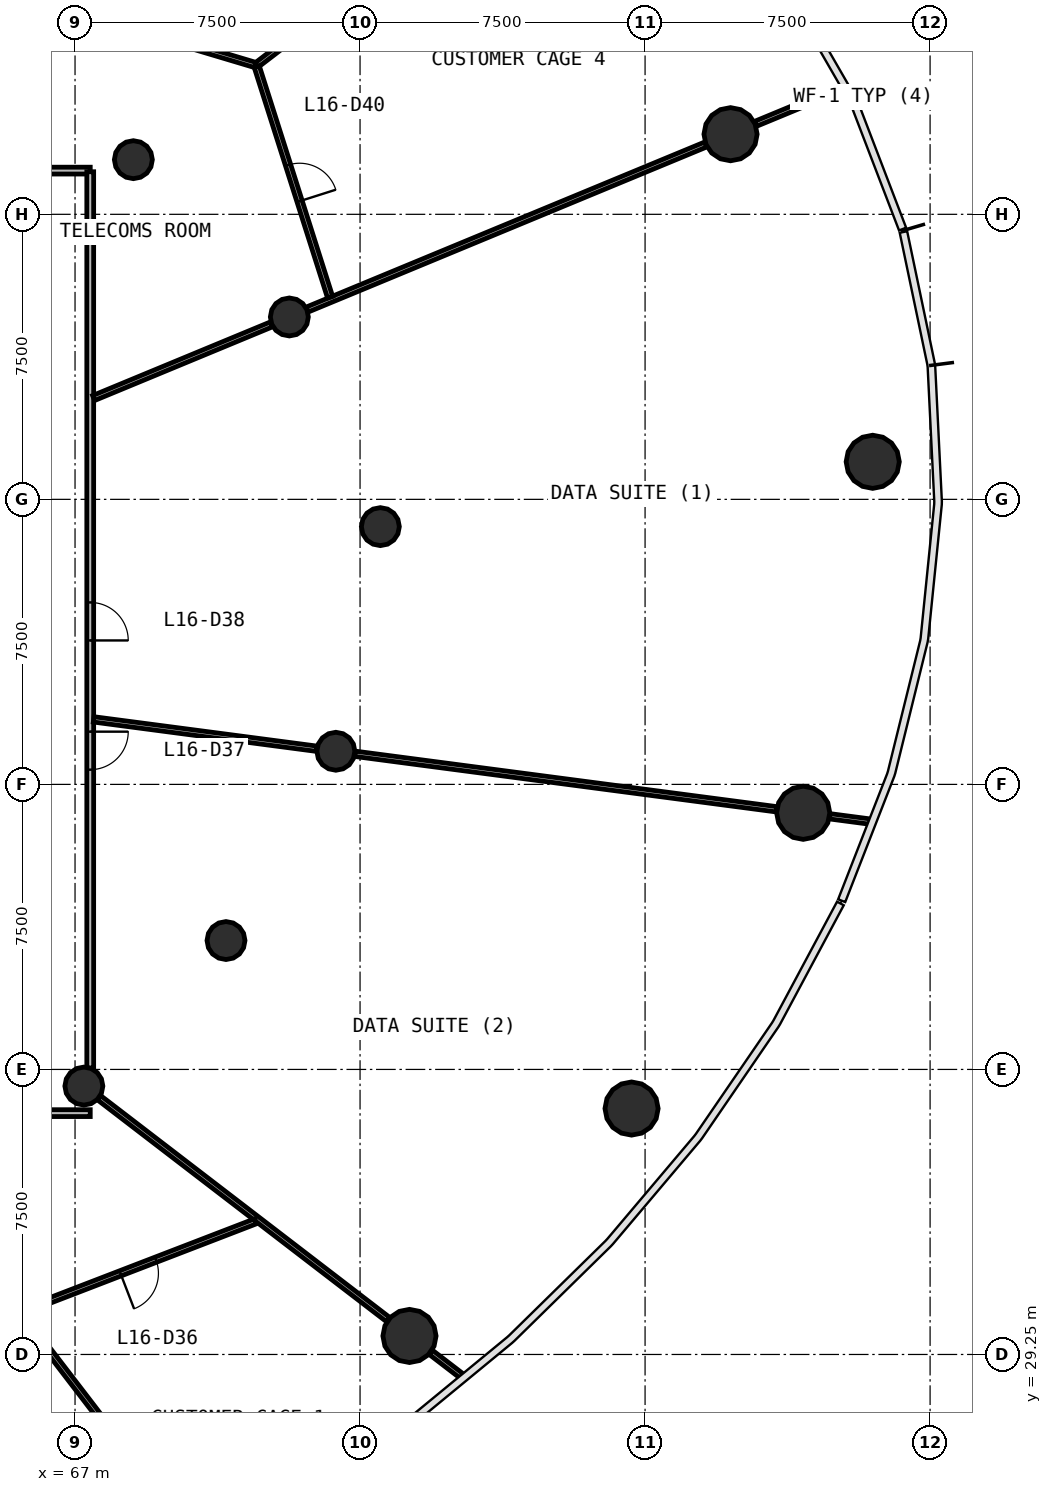
"""IFC4 building model, lengths in metres.
Left out: names, types, materials, properties, quantities, classifications, styles, units other than length and angle.
Written with IfcOpenShell. Run it as: python <this file> out.ifc"""

import sys

from ifc_helpers import new_model, si_unit, direction, frame, frame_2d, origin, origin_2d, place, context, subcontext, project, spatial, rectangle, circle, extrude, source, transform, mapped, element, fill, save


model = new_model("IFC4")
c1 = context("Model", 3, precision=1e-05, world=origin(), true_north=direction((0.0, 1.0)))
c2 = subcontext(c1, "Body", "Model", "MODEL_VIEW")
j1 = project(units=[si_unit("LENGTHUNIT", "METRE"), si_unit("PLANEANGLEUNIT", "RADIAN")], contexts=[c1])
p1 = place(None, origin())
s1 = spatial("IfcSite", under=j1, at=p1, CompositionType="ELEMENT")
p2 = place(p1, origin())
s2 = spatial("IfcBuilding", under=s1, at=p2, CompositionType="ELEMENT")
p3 = place(p2, frame((0.0, 0.0, 71.0)))
s3 = spatial("IfcBuildingStorey", under=s2, at=p3, CompositionType="ELEMENT", Elevation=71.0)
m1 = source(origin(), c2, "Body", "SweptSolid", [
    extrude(circle(Radius=0.7, at=origin_2d()), origin(), (0.0, 0.0, 1.0), 4.4),
])
for number, where, z_axis, x_axis in (
    (1, (87.99, 52.738, 0.0), (0.0, 0.0, 1.0), (1.0, 0.0, 0.0)),
    (2, (84.249, 61.358, 0.0), (0.0, 0.0, 1.0), (1.0, 0.0, 0.0)),
    (3, (75.801, 29.737, 0.0), (0.0, 0.0, 1.0), (1.0, 0.0, 0.0)),
    (4, (81.645, 35.721, 0.0), (0.0, 0.0, 1.0), (1.0, 0.0, 0.0)),
    (5, (86.161, 43.503, 0.0), (0.0, 0.0, 1.0), (1.0, 0.0, 0.0)),
):
    element("IfcColumn", number, at=place(p3, frame(where, z_axis=z_axis, x_axis=x_axis)), inside=s3, PredefinedType="COLUMN", context=c2, shape_type="MappedRepresentation", body=[
        mapped(m1, transform((0.0, 0.0, 0.0), scale=1.0)),
    ])
m2 = source(origin(), c2, "Body", "SweptSolid", [
    extrude(circle(Radius=0.5, at=origin_2d()), origin(), (0.0, 0.0, 1.0), 4.4),
])
for number, where, z_axis, x_axis in (
    (6, (75.034, 51.032, 0.0), (0.0, 0.0, 1.0), (1.0, 0.0, 0.0)),
    (7, (72.639, 56.549, 0.0), (0.0, 0.0, 1.0), (1.0, 0.0, 0.0)),
    (8, (68.535, 60.688, 0.0), (0.0, 0.0, 1.0), (1.0, 0.0, 0.0)),
    (9, (67.232, 36.312, 0.0), (0.0, 0.0, 1.0), (1.0, 0.0, 0.0)),
    (10, (70.972, 40.141, 0.0), (0.0, 0.0, 1.0), (1.0, 0.0, 0.0)),
    (11, (73.863, 45.122, 0.0), (0.0, 0.0, 1.0), (1.0, 0.0, 0.0)),
):
    element("IfcColumn", number, at=place(p3, frame(where, z_axis=z_axis, x_axis=x_axis)), inside=s3, PredefinedType="COLUMN", context=c2, shape_type="MappedRepresentation", body=[
        mapped(m2, transform((0.0, 0.0, 0.0), scale=1.0)),
    ])
p4 = place(p3, frame((67.4, 35.6, 0.0), z_axis=(0.0, 0.0, 1.0), x_axis=(-1.0, 0.0, 0.0)))
e12 = element("IfcWall", 12, at=p4, inside=s3, PredefinedType="PARTITIONING", context=c2, shape_type="SweptSolid", body=[
    extrude(rectangle(XDim=30.8, YDim=0.18, at=frame_2d((15.4, 0.0))), origin(), (0.0, 0.0, 1.0), 3.0),
])
p5 = place(p4, frame((14.95, 0.0, 0.0)))
e13 = element("IfcOpeningElement", 13, at=p5, cuts=e12, PredefinedType="OPENING", context=c2, shape_type="SweptSolid", body=[
    extrude(rectangle(XDim=1.0, YDim=2.1, at=frame_2d((0.5, 1.05))), frame((0.0, 0.1, 0.0), z_axis=(0.0, -1.0, 0.0), x_axis=(1.0, 0.0, 0.0)), (0.0, 0.0, 1.0), 0.2),
])
p6 = place(p4, frame((12.55, 0.0, 0.0)))
e14 = element("IfcOpeningElement", 14, at=p6, cuts=e12, PredefinedType="OPENING", context=c2, shape_type="SweptSolid", body=[
    extrude(rectangle(XDim=1.0, YDim=2.1, at=frame_2d((0.5, 1.05))), frame((0.0, 0.1, 0.0), z_axis=(0.0, -1.0, 0.0), x_axis=(1.0, 0.0, 0.0)), (0.0, 0.0, 1.0), 0.2),
])
p7 = place(p3, frame((36.6, 60.4, 0.0), z_axis=(0.0, 0.0, 1.0), x_axis=(1.0, 0.0, 0.0)))
e15 = element("IfcWall", 15, at=p7, inside=s3, PredefinedType="PARTITIONING", context=c2, shape_type="SweptSolid", body=[
    extrude(rectangle(XDim=30.8, YDim=0.18, at=frame_2d((15.4, 0.0))), origin(), (0.0, 0.0, 1.0), 3.0),
])
p8 = place(p7, frame((9.05, 0.0, 0.0)))
e16 = element("IfcOpeningElement", 16, at=p8, cuts=e15, PredefinedType="OPENING", context=c2, shape_type="SweptSolid", body=[
    extrude(rectangle(XDim=0.9, YDim=2.1, at=frame_2d((0.45, 1.05))), frame((0.0, 0.1, 0.0), z_axis=(0.0, -1.0, 0.0), x_axis=(1.0, 0.0, 0.0)), (0.0, 0.0, 1.0), 0.2),
])
p9 = place(p7, frame((6.05, 0.0, 0.0)))
e17 = element("IfcOpeningElement", 17, at=p9, cuts=e15, PredefinedType="OPENING", context=c2, shape_type="SweptSolid", body=[
    extrude(rectangle(XDim=0.9, YDim=2.1, at=frame_2d((0.45, 1.05))), frame((0.0, 0.1, 0.0), z_axis=(0.0, -1.0, 0.0), x_axis=(1.0, 0.0, 0.0)), (0.0, 0.0, 1.0), 0.2),
])
p10 = place(p7, frame((2.45, 0.0, 0.0)))
e18 = element("IfcOpeningElement", 18, at=p10, cuts=e15, PredefinedType="OPENING", context=c2, shape_type="SweptSolid", body=[
    extrude(rectangle(XDim=0.9, YDim=2.1, at=frame_2d((0.45, 1.05))), frame((0.0, 0.1, 0.0), z_axis=(0.0, -1.0, 0.0), x_axis=(1.0, 0.0, 0.0)), (0.0, 0.0, 1.0), 0.2),
])
p11 = place(p7, frame((20.95, 0.0, 0.0)))
e19 = element("IfcOpeningElement", 19, at=p11, cuts=e15, PredefinedType="OPENING", context=c2, shape_type="SweptSolid", body=[
    extrude(rectangle(XDim=1.0, YDim=2.1, at=frame_2d((0.5, 1.05))), frame((0.0, 0.1, 0.0), z_axis=(0.0, -1.0, 0.0), x_axis=(1.0, 0.0, 0.0)), (0.0, 0.0, 1.0), 0.2),
])
p12 = place(p7, frame((14.95, 0.0, 0.0)))
e20 = element("IfcOpeningElement", 20, at=p12, cuts=e15, PredefinedType="OPENING", context=c2, shape_type="SweptSolid", body=[
    extrude(rectangle(XDim=1.0, YDim=2.1, at=frame_2d((0.5, 1.05))), frame((0.0, 0.1, 0.0), z_axis=(0.0, -1.0, 0.0), x_axis=(1.0, 0.0, 0.0)), (0.0, 0.0, 1.0), 0.2),
])
p13 = place(p7, frame((12.55, 0.0, 0.0)))
e21 = element("IfcOpeningElement", 21, at=p13, cuts=e15, PredefinedType="OPENING", context=c2, shape_type="SweptSolid", body=[
    extrude(rectangle(XDim=1.0, YDim=2.1, at=frame_2d((0.5, 1.05))), frame((0.0, 0.1, 0.0), z_axis=(0.0, -1.0, 0.0), x_axis=(1.0, 0.0, 0.0)), (0.0, 0.0, 1.0), 0.2),
])
p14 = place(p3, frame((67.4, 60.37, 0.0), z_axis=(0.0, 0.0, 1.0), x_axis=(0.0, -1.0, 0.0)))
e22 = element("IfcWall", 22, at=p14, inside=s3, PredefinedType="PARTITIONING", context=c2, shape_type="SweptSolid", body=[
    extrude(rectangle(XDim=23.583, YDim=0.18, at=frame_2d((11.791, 0.0))), origin(), (0.0, 0.0, 1.0), 3.0),
])
p15 = place(p14, frame((14.732, 0.0, 0.0)))
e23 = element("IfcOpeningElement", 23, at=p15, cuts=e22, PredefinedType="OPENING", context=c2, shape_type="SweptSolid", body=[
    extrude(rectangle(XDim=1.0, YDim=2.1, at=frame_2d((0.5, 1.05))), frame((0.0, 0.1, 0.0), z_axis=(0.0, -1.0, 0.0), x_axis=(1.0, 0.0, 0.0)), (0.0, 0.0, 1.0), 0.2),
])
p16 = place(p14, frame((11.333, 0.0, 0.0)))
e24 = element("IfcOpeningElement", 24, at=p16, cuts=e22, PredefinedType="OPENING", context=c2, shape_type="SweptSolid", body=[
    extrude(rectangle(XDim=1.0, YDim=2.1, at=frame_2d((0.5, 1.05))), frame((0.0, 0.1, 0.0), z_axis=(0.0, -1.0, 0.0), x_axis=(1.0, 0.0, 0.0)), (0.0, 0.0, 1.0), 0.2),
])
p17 = place(p3, frame((73.106, 56.742, 0.0), z_axis=(0.0, 0.0, 1.0), x_axis=(0.923875075531, 0.382694192291, 0.0)))
e25 = element("IfcWall", 25, at=p17, inside=s3, PredefinedType="PARTITIONING", context=c2, shape_type="SweptSolid", body=[
    extrude(rectangle(XDim=11.356, YDim=0.14, at=frame_2d((5.678, 0.0))), origin(), (0.0, 0.0, 1.0), 3.0),
])
p18 = place(p3, frame((74.363, 45.056, 0.0), z_axis=(0.0, 0.0, 1.0), x_axis=(0.991443306772, -0.130538000051, 0.0)))
e26 = element("IfcWall", 26, at=p18, inside=s3, PredefinedType="PARTITIONING", context=c2, shape_type="SweptSolid", body=[
    extrude(rectangle(XDim=11.195, YDim=0.14, at=frame_2d((5.598, 0.0))), origin(), (0.0, 0.0, 1.0), 3.0),
])
p19 = place(p3, frame((67.633, 36.005, 0.0), z_axis=(0.0, 0.0, 1.0), x_axis=(0.793366218398, -0.608744645566, 0.0)))
e27 = element("IfcWall", 27, at=p19, inside=s3, PredefinedType="PARTITIONING", context=c2, shape_type="SweptSolid", body=[
    extrude(rectangle(XDim=9.591, YDim=0.14, at=frame_2d((4.796, 0.0))), origin(), (0.0, 0.0, 1.0), 3.0),
])
p20 = place(p3, frame((71.771, 63.171, 0.0), z_axis=(0.0, 0.0, 1.0), x_axis=(0.793362269214, 0.608749792433, 0.0)))
e28 = element("IfcWall", 28, at=p20, inside=s3, PredefinedType="PARTITIONING", context=c2, shape_type="SweptSolid", body=[
    extrude(rectangle(XDim=6.94, YDim=0.14, at=frame_2d((3.47, 0.0))), origin(), (0.0, 0.0, 1.0), 3.0),
])
p21 = place(p3, frame((65.229, 65.126, 0.0), z_axis=(0.0, 0.0, 1.0), x_axis=(0.95810065558, -0.286431726205, 0.0)))
e29 = element("IfcWall", 29, at=p21, inside=s3, PredefinedType="PARTITIONING", context=c2, shape_type="SweptSolid", body=[
    extrude(rectangle(XDim=6.798, YDim=0.14, at=frame_2d((3.399, 0.0))), origin(), (0.0, 0.0, 1.0), 3.0),
])
p22 = place(p21, frame((2.947, 0.0, 0.0)))
e30 = element("IfcOpeningElement", 30, at=p22, cuts=e29, PredefinedType="OPENING", context=c2, shape_type="SweptSolid", body=[
    extrude(rectangle(XDim=1.0, YDim=2.1, at=frame_2d((0.5, 1.05))), frame((0.0, 0.08, 0.0), z_axis=(0.0, -1.0, 0.0), x_axis=(1.0, 0.0, 0.0)), (0.0, 0.0, 1.0), 0.16),
])
p23 = place(p3, frame((71.753, 32.755, 0.0), z_axis=(0.0, 0.0, 1.0), x_axis=(-0.933202930279, -0.359349816917, 0.0)))
e31 = element("IfcWall", 31, at=p23, inside=s3, PredefinedType="PARTITIONING", context=c2, shape_type="SweptSolid", body=[
    extrude(rectangle(XDim=6.663, YDim=0.14, at=frame_2d((3.332, 0.0))), origin(), (0.0, 0.0, 1.0), 3.0),
])
p24 = place(p23, frame((2.812, 0.0, 0.0)))
e32 = element("IfcOpeningElement", 32, at=p24, cuts=e31, PredefinedType="OPENING", context=c2, shape_type="SweptSolid", body=[
    extrude(rectangle(XDim=1.0, YDim=2.1, at=frame_2d((0.5, 1.05))), frame((0.0, 0.08, 0.0), z_axis=(0.0, -1.0, 0.0), x_axis=(1.0, 0.0, 0.0)), (0.0, 0.0, 1.0), 0.16),
])
p25 = place(p3, frame((71.78, 63.142, 0.0), z_axis=(0.0, 0.0, 1.0), x_axis=(0.303141987912, -0.952945399887, 0.0)))
e33 = element("IfcWall", 33, at=p25, inside=s3, PredefinedType="PARTITIONING", context=c2, shape_type="SweptSolid", body=[
    extrude(rectangle(XDim=6.373, YDim=0.14, at=frame_2d((3.187, 0.0))), origin(), (0.0, 0.0, 1.0), 3.0),
])
p26 = place(p25, frame((2.723, 0.0, 0.0)))
e34 = element("IfcOpeningElement", 34, at=p26, cuts=e33, PredefinedType="OPENING", context=c2, shape_type="SweptSolid", body=[
    extrude(rectangle(XDim=1.0, YDim=2.1, at=frame_2d((0.5, 1.05))), frame((0.0, 0.08, 0.0), z_axis=(0.0, -1.0, 0.0), x_axis=(1.0, 0.0, 0.0)), (0.0, 0.0, 1.0), 0.16),
])
p27 = place(p3, frame((67.49, 45.961, 0.0), z_axis=(0.0, 0.0, 1.0), x_axis=(0.991445034615, -0.130524876315, 0.0)))
e35 = element("IfcWall", 35, at=p27, inside=s3, PredefinedType="PARTITIONING", context=c2, shape_type="SweptSolid", body=[
    extrude(rectangle(XDim=5.924, YDim=0.14, at=frame_2d((2.962, 0.0))), origin(), (0.0, 0.0, 1.0), 3.0),
])
p28 = place(p3, frame((65.579, 30.303, 0.0), z_axis=(0.0, 0.0, 1.0), x_axis=(0.608777700967, -0.793340854113, 0.0)))
e36 = element("IfcWall", 36, at=p28, inside=s3, PredefinedType="PARTITIONING", context=c2, shape_type="SweptSolid", body=[
    extrude(rectangle(XDim=5.566, YDim=0.14, at=frame_2d((2.783, 0.0))), origin(), (0.0, 0.0, 1.0), 3.0),
])
p29 = place(p3, frame((67.49, 54.416, 0.0), z_axis=(0.0, 0.0, 1.0), x_axis=(0.923890025086, 0.382658100067, 0.0)))
e37 = element("IfcWall", 37, at=p29, inside=s3, PredefinedType="PARTITIONING", context=c2, shape_type="SweptSolid", body=[
    extrude(rectangle(XDim=5.068, YDim=0.14, at=frame_2d((2.534, 0.0))), origin(), (0.0, 0.0, 1.0), 3.0),
])
p30 = place(p3, frame((84.9, 61.628, 0.0), z_axis=(0.0, 0.0, 1.0), x_axis=(0.92388481198, 0.382670686352, 0.0)))
e38 = element("IfcWall", 38, at=p30, inside=s3, PredefinedType="PARTITIONING", context=c2, shape_type="SweptSolid", body=[
    extrude(rectangle(XDim=2.479, YDim=0.14, at=frame_2d((1.24, 0.0))), origin(), (0.0, 0.0, 1.0), 3.0),
])
p31 = place(p3, frame((86.859, 43.411, 0.0), z_axis=(0.0, 0.0, 1.0), x_axis=(0.991441129852, -0.130554532814, 0.0)))
e39 = element("IfcWall", 39, at=p31, inside=s3, PredefinedType="PARTITIONING", context=c2, shape_type="SweptSolid", body=[
    extrude(rectangle(XDim=1.073, YDim=0.14, at=frame_2d((0.537, 0.0))), origin(), (0.0, 0.0, 1.0), 3.0),
])
p32 = place(p3, frame((77.173, 28.684, 0.0), z_axis=(0.0, 0.0, 1.0), x_axis=(-0.793207707095, 0.608951174895, 0.0)))
e40 = element("IfcWall", 40, at=p32, inside=s3, PredefinedType="PARTITIONING", context=c2, shape_type="SweptSolid", body=[
    extrude(rectangle(XDim=1.026, YDim=0.14, at=frame_2d((0.513, 0.0))), origin(), (0.0, 0.0, 1.0), 3.0),
])
m3 = source(origin(), c2, "Body", "SweptSolid", [
    extrude(rectangle(XDim=1.0, YDim=2.1, at=frame_2d((0.5, 1.05))), frame((0.0, 0.025, 0.0), z_axis=(0.0, -1.0, 0.0), x_axis=(1.0, 0.0, 0.0)), (0.0, 0.0, 1.0), 0.05),
])
p33 = place(p24, origin())
e41 = element("IfcDoor", 41, at=p33, inside=s3, OperationType="SINGLE_SWING_RIGHT", PredefinedType="DOOR", context=c2, shape_type="MappedRepresentation", body=[
    mapped(m3, transform((0.0, 0.0, 0.0), scale=1.0)),
])
fill(e32, e41)
p34 = place(p15, origin())
e42 = element("IfcDoor", 42, at=p34, inside=s3, OperationType="SINGLE_SWING_LEFT", PredefinedType="DOOR", context=c2, shape_type="MappedRepresentation", body=[
    mapped(m3, transform((0.0, 0.0, 0.0), scale=1.0)),
])
fill(e23, e42)
p35 = place(p16, origin())
e43 = element("IfcDoor", 43, at=p35, inside=s3, OperationType="SINGLE_SWING_RIGHT", PredefinedType="DOOR", context=c2, shape_type="MappedRepresentation", body=[
    mapped(m3, transform((0.0, 0.0, 0.0), scale=1.0)),
])
fill(e24, e43)
p36 = place(p26, origin())
e44 = element("IfcDoor", 44, at=p36, inside=s3, OperationType="SINGLE_SWING_RIGHT", PredefinedType="DOOR", context=c2, shape_type="MappedRepresentation", body=[
    mapped(m3, transform((0.0, 0.0, 0.0), scale=1.0)),
])
fill(e34, e44)
save(model, sys.argv[1])
